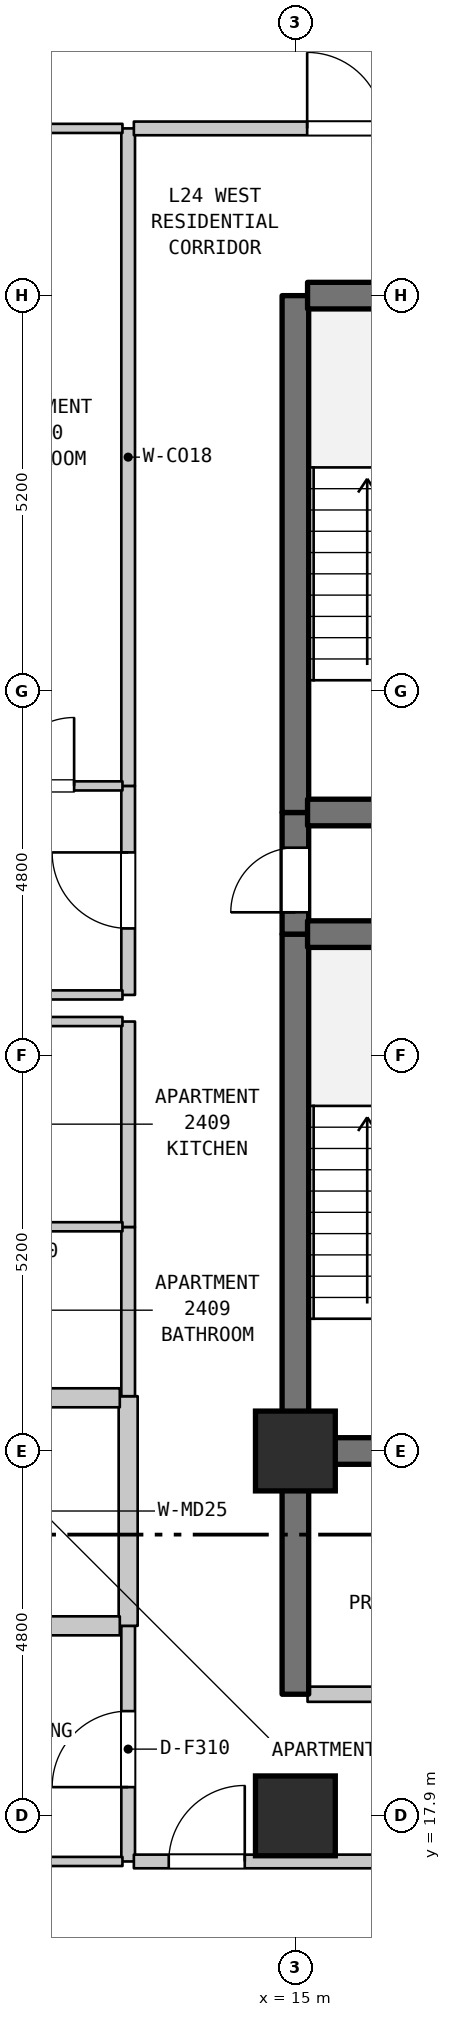
"""IFC4 building model, lengths in metres.
Left out: names, types, materials, properties, quantities, classifications, styles, units other than length and angle.
Written with IfcOpenShell. Run it as: python <this file> out.ifc"""

import sys

from ifc_helpers import new_model, si_unit, direction, frame, frame_2d, origin, origin_2d, place, context, subcontext, project, spatial, rectangle, extrude, element, fill, save


model = new_model("IFC4")
c1 = context("Model", 3, precision=1e-05, world=origin(), true_north=direction((0.0, 1.0)))
c2 = subcontext(c1, "Body", "Model", "MODEL_VIEW")
j1 = project(units=[si_unit("LENGTHUNIT", "METRE"), si_unit("PLANEANGLEUNIT", "RADIAN")], contexts=[c1])
p1 = place(None, origin())
s1 = spatial("IfcSite", under=j1, at=p1, CompositionType="ELEMENT")
p2 = place(p1, origin())
s2 = spatial("IfcBuilding", under=s1, at=p2, CompositionType="ELEMENT")
p3 = place(p2, frame((0.0, 0.0, 102.0)))
s3 = spatial("IfcBuildingStorey", under=s2, at=p3, CompositionType="ELEMENT", Elevation=102.0)
for number, where, z_axis, x_axis in (
    (1, (15.0, 17.9, 0.0), (0.0, 0.0, 1.0), (1.0, 0.0, 0.0)),
    (2, (15.0, 22.7, 0.0), (0.0, 0.0, 1.0), (1.0, 0.0, 0.0)),
):
    element("IfcColumn", number, at=place(p3, frame(where, z_axis=z_axis, x_axis=x_axis)), inside=s3, PredefinedType="COLUMN", context=c2, shape_type="SweptSolid", body=[
        extrude(rectangle(XDim=1.05, YDim=1.05, at=origin_2d()), origin(), (0.0, 0.0, 1.0), 3.7),
    ])
p4 = place(p3, frame((12.8, 17.3, 0.0), z_axis=(0.0, 0.0, 1.0), x_axis=(0.0, 1.0, 0.0)))
e3 = element("IfcWall", 3, at=p4, inside=s3, PredefinedType="STANDARD", context=c2, shape_type="SweptSolid", body=[
    extrude(rectangle(XDim=3.1, YDim=0.18, at=frame_2d((1.55, 0.0))), origin(), (0.0, 0.0, 1.0), 3.385),
])
p5 = place(p4, frame((0.978, 0.0, 0.0)))
e4 = element("IfcOpeningElement", 4, at=p5, cuts=e3, PredefinedType="OPENING", context=c2, shape_type="SweptSolid", body=[
    extrude(rectangle(XDim=1.0, YDim=2.15, at=frame_2d((0.5, 1.075))), frame((0.0, 0.1, 0.0), z_axis=(0.0, -1.0, 0.0), x_axis=(1.0, 0.0, 0.0)), (0.0, 0.0, 1.0), 0.2),
])
p6 = place(p3, frame((12.8, 20.4, 0.0), z_axis=(0.0, 0.0, 1.0), x_axis=(0.0, 1.0, 0.0)))
e5 = element("IfcWall", 5, at=p6, inside=s3, PredefinedType="STANDARD", context=c2, shape_type="SweptSolid", body=[
    extrude(rectangle(XDim=3.021, YDim=0.25, at=frame_2d((1.51, 0.0))), origin(), (0.0, 0.0, 1.0), 3.385),
])
p7 = place(p3, frame((12.8, 23.421, 0.0), z_axis=(0.0, 0.0, 1.0), x_axis=(0.0, 1.0, 0.0)))
e6 = element("IfcWall", 6, at=p7, inside=s3, PredefinedType="STANDARD", context=c2, shape_type="SweptSolid", body=[
    extrude(rectangle(XDim=2.226, YDim=0.18, at=frame_2d((1.113, 0.0))), origin(), (0.0, 0.0, 1.0), 3.385),
])
p8 = place(p3, frame((12.8, 25.647, 0.0), z_axis=(0.0, 0.0, 1.0), x_axis=(0.0, 1.0, 0.0)))
e7 = element("IfcWall", 7, at=p8, inside=s3, PredefinedType="STANDARD", context=c2, shape_type="SweptSolid", body=[
    extrude(rectangle(XDim=2.703, YDim=0.18, at=frame_2d((1.352, 0.0))), origin(), (0.0, 0.0, 1.0), 3.385),
])
p9 = place(p3, frame((12.8, 28.7, 0.0), z_axis=(0.0, 0.0, 1.0), x_axis=(0.0, 1.0, 0.0)))
e8 = element("IfcWall", 8, at=p9, inside=s3, PredefinedType="STANDARD", context=c2, shape_type="SweptSolid", body=[
    extrude(rectangle(XDim=2.75, YDim=0.18, at=frame_2d((1.375, 0.0))), origin(), (0.0, 0.0, 1.0), 3.385),
])
p10 = place(p9, frame((0.875, 0.0, 0.0)))
e9 = element("IfcOpeningElement", 9, at=p10, cuts=e8, PredefinedType="OPENING", context=c2, shape_type="SweptSolid", body=[
    extrude(rectangle(XDim=1.0, YDim=2.15, at=frame_2d((0.5, 1.075))), frame((0.0, 0.1, 0.0), z_axis=(0.0, -1.0, 0.0), x_axis=(1.0, 0.0, 0.0)), (0.0, 0.0, 1.0), 0.2),
])
p11 = place(p3, frame((12.8, 31.45, 0.0), z_axis=(0.0, 0.0, 1.0), x_axis=(0.0, 1.0, 0.0)))
e10 = element("IfcWall", 10, at=p11, inside=s3, PredefinedType="STANDARD", context=c2, shape_type="SweptSolid", body=[
    extrude(rectangle(XDim=8.65, YDim=0.18, at=frame_2d((4.325, 0.0))), origin(), (0.0, 0.0, 1.0), 3.385),
])
p12 = place(p3, frame((15.0, 19.5, 0.0), z_axis=(0.0, 0.0, 1.0), x_axis=(0.0, 1.0, 0.0)))
e11 = element("IfcWall", 11, at=p12, inside=s3, PredefinedType="SHEAR", context=c2, shape_type="SweptSolid", body=[
    extrude(rectangle(XDim=3.2, YDim=0.35, at=frame_2d((1.6, 0.0))), origin(), (0.0, 0.0, 1.0), 3.385),
])
p13 = place(p3, frame((15.0, 22.7, 0.0), z_axis=(0.0, 0.0, 1.0), x_axis=(0.0, 1.0, 0.0)))
e12 = element("IfcWall", 12, at=p13, inside=s3, PredefinedType="SHEAR", context=c2, shape_type="SweptSolid", body=[
    extrude(rectangle(XDim=6.8, YDim=0.35, at=frame_2d((3.4, 0.0))), origin(), (0.0, 0.0, 1.0), 3.385),
])
p14 = place(p3, frame((15.0, 29.5, 0.0), z_axis=(0.0, 0.0, 1.0), x_axis=(0.0, 1.0, 0.0)))
e13 = element("IfcWall", 13, at=p14, inside=s3, PredefinedType="SHEAR", context=c2, shape_type="SweptSolid", body=[
    extrude(rectangle(XDim=1.6, YDim=0.35, at=frame_2d((0.8, 0.0))), origin(), (0.0, 0.0, 1.0), 3.385),
])
p15 = place(p14, frame((0.287, 0.0, 0.0)))
e14 = element("IfcOpeningElement", 14, at=p15, cuts=e13, PredefinedType="OPENING", context=c2, shape_type="SweptSolid", body=[
    extrude(rectangle(XDim=0.85, YDim=2.1, at=frame_2d((0.425, 1.05))), frame((0.0, 0.185, 0.0), z_axis=(0.0, -1.0, 0.0), x_axis=(1.0, 0.0, 0.0)), (0.0, 0.0, 1.0), 0.37),
])
p16 = place(p3, frame((15.0, 31.1, 0.0), z_axis=(0.0, 0.0, 1.0), x_axis=(0.0, 1.0, 0.0)))
e15 = element("IfcWall", 15, at=p16, inside=s3, PredefinedType="SHEAR", context=c2, shape_type="SweptSolid", body=[
    extrude(rectangle(XDim=6.8, YDim=0.35, at=frame_2d((3.4, 0.0))), origin(), (0.0, 0.0, 1.0), 3.385),
])
p17 = place(p3, frame((9.085, 17.3, 0.0), z_axis=(0.0, 0.0, 1.0), x_axis=(1.0, 0.0, 0.0)))
e16 = element("IfcWall", 16, at=p17, inside=s3, PredefinedType="PARTITIONING", context=c2, shape_type="SweptSolid", body=[
    extrude(rectangle(XDim=3.64, YDim=0.12, at=frame_2d((1.82, 0.0))), origin(), (0.0, 0.0, 1.0), 3.385),
])
p18 = place(p3, frame((12.875, 17.3, 0.0), z_axis=(0.0, 0.0, 1.0), x_axis=(1.0, 0.0, 0.0)))
e17 = element("IfcWall", 17, at=p18, inside=s3, PredefinedType="STANDARD", context=c2, shape_type="SweptSolid", body=[
    extrude(rectangle(XDim=3.5, YDim=0.18, at=frame_2d((1.75, 0.0))), origin(), (0.0, 0.0, 1.0), 3.385),
])
p19 = place(p18, frame((0.459, 0.0, 0.0)))
e18 = element("IfcOpeningElement", 18, at=p19, cuts=e17, PredefinedType="OPENING", context=c2, shape_type="SweptSolid", body=[
    extrude(rectangle(XDim=1.0, YDim=2.15, at=frame_2d((0.5, 1.075))), frame((0.0, 0.1, 0.0), z_axis=(0.0, -1.0, 0.0), x_axis=(1.0, 0.0, 0.0)), (0.0, 0.0, 1.0), 0.2),
])
p20 = place(p3, frame((15.16, 19.5, 0.0), z_axis=(0.0, 0.0, 1.0), x_axis=(1.0, 0.0, 0.0)))
e19 = element("IfcWall", 19, at=p20, inside=s3, PredefinedType="STANDARD", context=c2, shape_type="SweptSolid", body=[
    extrude(rectangle(XDim=3.68, YDim=0.2, at=frame_2d((1.84, 0.0))), origin(), (0.0, 0.0, 1.0), 3.385),
])
p21 = place(p20, frame((1.39, 0.0, 0.0)))
e20 = element("IfcOpeningElement", 20, at=p21, cuts=e19, PredefinedType="OPENING", context=c2, shape_type="SweptSolid", body=[
    extrude(rectangle(XDim=0.9, YDim=2.15, at=frame_2d((0.45, 1.075))), frame((0.0, 0.11, 0.0), z_axis=(0.0, -1.0, 0.0), x_axis=(1.0, 0.0, 0.0)), (0.0, 0.0, 1.0), 0.22),
])
p22 = place(p3, frame((10.66, 20.4, 0.0), z_axis=(0.0, 0.0, 1.0), x_axis=(1.0, 0.0, 0.0)))
e21 = element("IfcWall", 21, at=p22, inside=s3, PredefinedType="STANDARD", context=c2, shape_type="SweptSolid", body=[
    extrude(rectangle(XDim=2.03, YDim=0.25, at=frame_2d((1.015, 0.0))), origin(), (0.0, 0.0, 1.0), 3.385),
])
p23 = place(p3, frame((15.16, 22.7, 0.0), z_axis=(0.0, 0.0, 1.0), x_axis=(1.0, 0.0, 0.0)))
e22 = element("IfcWall", 22, at=p23, inside=s3, PredefinedType="SHEAR", context=c2, shape_type="SweptSolid", body=[
    extrude(rectangle(XDim=3.68, YDim=0.35, at=frame_2d((1.84, 0.0))), origin(), (0.0, 0.0, 1.0), 3.385),
])
p24 = place(p3, frame((10.66, 23.4, 0.0), z_axis=(0.0, 0.0, 1.0), x_axis=(1.0, 0.0, 0.0)))
e23 = element("IfcWall", 23, at=p24, inside=s3, PredefinedType="STANDARD", context=c2, shape_type="SweptSolid", body=[
    extrude(rectangle(XDim=2.03, YDim=0.25, at=frame_2d((1.015, 0.0))), origin(), (0.0, 0.0, 1.0), 3.385),
])
for number, where, z_axis, x_axis in (
    (24, (10.595, 25.65, 0.0), (0.0, 0.0, 1.0), (1.0, 0.0, 0.0)),
    (25, (10.595, 28.35, 0.0), (0.0, 0.0, 1.0), (1.0, 0.0, 0.0)),
):
    element("IfcWall", number, at=place(p3, frame(where, z_axis=z_axis, x_axis=x_axis)), inside=s3, PredefinedType="PARTITIONING", context=c2, shape_type="SweptSolid", body=[
        extrude(rectangle(XDim=2.13, YDim=0.12, at=frame_2d((1.065, 0.0))), origin(), (0.0, 0.0, 1.0), 3.385),
    ])
p25 = place(p3, frame((9.03, 28.7, 0.0), z_axis=(0.0, 0.0, 1.0), x_axis=(1.0, 0.0, 0.0)))
e26 = element("IfcWall", 26, at=p25, inside=s3, PredefinedType="PARTITIONING", context=c2, shape_type="SweptSolid", body=[
    extrude(rectangle(XDim=3.695, YDim=0.12, at=frame_2d((1.848, 0.0))), origin(), (0.0, 0.0, 1.0), 3.385),
])
for number, where, z_axis, x_axis in (
    (27, (15.16, 29.5, 0.0), (0.0, 0.0, 1.0), (1.0, 0.0, 0.0)),
    (28, (15.16, 31.1, 0.0), (0.0, 0.0, 1.0), (1.0, 0.0, 0.0)),
):
    element("IfcWall", number, at=place(p3, frame(where, z_axis=z_axis, x_axis=x_axis)), inside=s3, PredefinedType="SHEAR", context=c2, shape_type="SweptSolid", body=[
        extrude(rectangle(XDim=3.68, YDim=0.35, at=frame_2d((1.84, 0.0))), origin(), (0.0, 0.0, 1.0), 3.385),
    ])
p26 = place(p3, frame((10.523, 31.45, 0.0), z_axis=(0.0, 0.0, 1.0), x_axis=(1.0, 0.0, 0.0)))
e29 = element("IfcWall", 29, at=p26, inside=s3, PredefinedType="PARTITIONING", context=c2, shape_type="SweptSolid", body=[
    extrude(rectangle(XDim=2.202, YDim=0.12, at=frame_2d((1.101, 0.0))), origin(), (0.0, 0.0, 1.0), 3.385),
])
p27 = place(p26, frame((0.666, 0.0, 0.0)))
e30 = element("IfcOpeningElement", 30, at=p27, cuts=e29, PredefinedType="OPENING", context=c2, shape_type="SweptSolid", body=[
    extrude(rectangle(XDim=0.9, YDim=2.1, at=frame_2d((0.45, 1.05))), frame((0.0, 0.07, 0.0), z_axis=(0.0, -1.0, 0.0), x_axis=(1.0, 0.0, 0.0)), (0.0, 0.0, 1.0), 0.14),
])
p28 = place(p3, frame((15.16, 37.9, 0.0), z_axis=(0.0, 0.0, 1.0), x_axis=(1.0, 0.0, 0.0)))
e31 = element("IfcWall", 31, at=p28, inside=s3, PredefinedType="SHEAR", context=c2, shape_type="SweptSolid", body=[
    extrude(rectangle(XDim=3.68, YDim=0.35, at=frame_2d((1.84, 0.0))), origin(), (0.0, 0.0, 1.0), 3.385),
])
p29 = place(p3, frame((10.523, 40.1, 0.0), z_axis=(0.0, 0.0, 1.0), x_axis=(1.0, 0.0, 0.0)))
e32 = element("IfcWall", 32, at=p29, inside=s3, PredefinedType="PARTITIONING", context=c2, shape_type="SweptSolid", body=[
    extrude(rectangle(XDim=2.202, YDim=0.12, at=frame_2d((1.101, 0.0))), origin(), (0.0, 0.0, 1.0), 3.385),
])
p30 = place(p3, frame((12.875, 40.1, 0.0), z_axis=(0.0, 0.0, 1.0), x_axis=(1.0, 0.0, 0.0)))
e33 = element("IfcWall", 33, at=p30, inside=s3, PredefinedType="STANDARD", context=c2, shape_type="SweptSolid", body=[
    extrude(rectangle(XDim=5.59, YDim=0.18, at=frame_2d((2.795, 0.0))), origin(), (0.0, 0.0, 1.0), 3.385),
])
p31 = place(p30, frame((2.28, 0.0, 0.0)))
e34 = element("IfcOpeningElement", 34, at=p31, cuts=e33, PredefinedType="OPENING", context=c2, shape_type="SweptSolid", body=[
    extrude(rectangle(XDim=1.0, YDim=2.15, at=frame_2d((0.5, 1.075))), frame((0.0, 0.1, 0.0), z_axis=(0.0, -1.0, 0.0), x_axis=(1.0, 0.0, 0.0)), (0.0, 0.0, 1.0), 0.2),
])
p32 = place(p5, origin())
e35 = element("IfcDoor", 35, at=p32, inside=s3, OperationType="SINGLE_SWING_LEFT", PredefinedType="DOOR", context=c2, shape_type="SweptSolid", body=[
    extrude(rectangle(XDim=1.0, YDim=2.15, at=frame_2d((0.5, 1.075))), frame((0.0, 0.025, 0.0), z_axis=(0.0, -1.0, 0.0), x_axis=(1.0, 0.0, 0.0)), (0.0, 0.0, 1.0), 0.05),
])
fill(e4, e35)
p33 = place(p10, origin())
e36 = element("IfcDoor", 36, at=p33, inside=s3, OperationType="SINGLE_SWING_RIGHT", PredefinedType="DOOR", context=c2, shape_type="SweptSolid", body=[
    extrude(rectangle(XDim=1.0, YDim=2.15, at=frame_2d((0.5, 1.075))), frame((0.0, 0.025, 0.0), z_axis=(0.0, -1.0, 0.0), x_axis=(1.0, 0.0, 0.0)), (0.0, 0.0, 1.0), 0.05),
])
fill(e9, e36)
p34 = place(p15, origin())
e37 = element("IfcDoor", 37, at=p34, inside=s3, OperationType="SINGLE_SWING_LEFT", PredefinedType="DOOR", context=c2, shape_type="SweptSolid", body=[
    extrude(rectangle(XDim=0.85, YDim=2.1, at=frame_2d((0.425, 1.05))), frame((0.0, 0.025, 0.0), z_axis=(0.0, -1.0, 0.0), x_axis=(1.0, 0.0, 0.0)), (0.0, 0.0, 1.0), 0.05),
])
fill(e14, e37)
p35 = place(p19, origin())
e38 = element("IfcDoor", 38, at=p35, inside=s3, OperationType="SINGLE_SWING_RIGHT", PredefinedType="DOOR", context=c2, shape_type="SweptSolid", body=[
    extrude(rectangle(XDim=1.0, YDim=2.15, at=frame_2d((0.5, 1.075))), frame((0.0, 0.025, 0.0), z_axis=(0.0, -1.0, 0.0), x_axis=(1.0, 0.0, 0.0)), (0.0, 0.0, 1.0), 0.05),
])
fill(e18, e38)
p36 = place(p27, origin())
e39 = element("IfcDoor", 39, at=p36, inside=s3, OperationType="SINGLE_SWING_RIGHT", PredefinedType="DOOR", context=c2, shape_type="SweptSolid", body=[
    extrude(rectangle(XDim=0.9, YDim=2.1, at=frame_2d((0.45, 1.05))), frame((0.0, 0.025, 0.0), z_axis=(0.0, -1.0, 0.0), x_axis=(1.0, 0.0, 0.0)), (0.0, 0.0, 1.0), 0.05),
])
fill(e30, e39)
p37 = place(p31, origin())
e40 = element("IfcDoor", 40, at=p37, inside=s3, OperationType="SINGLE_SWING_LEFT", PredefinedType="DOOR", context=c2, shape_type="SweptSolid", body=[
    extrude(rectangle(XDim=1.0, YDim=2.15, at=frame_2d((0.5, 1.075))), frame((0.0, 0.025, 0.0), z_axis=(0.0, -1.0, 0.0), x_axis=(1.0, 0.0, 0.0)), (0.0, 0.0, 1.0), 0.05),
])
fill(e34, e40)
save(model, sys.argv[1])
